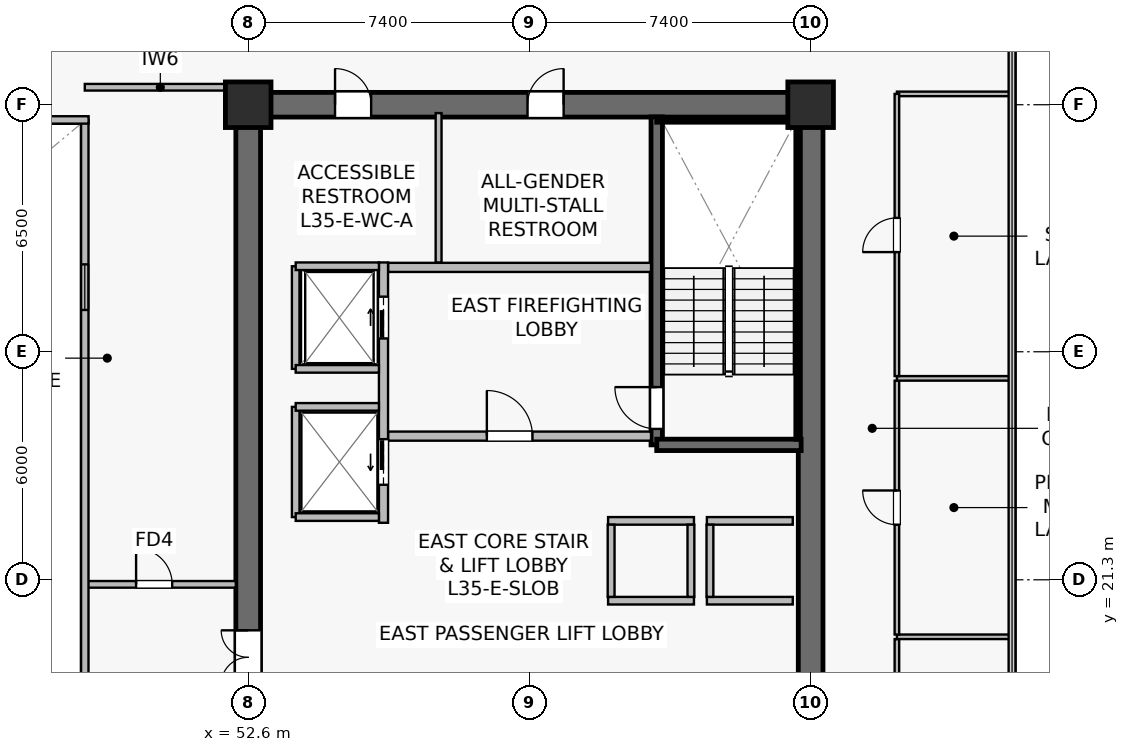
"""IFC4 building model, lengths in metres.
Left out: names, types, materials, properties, quantities, classifications, styles, units other than length and angle.
Written with IfcOpenShell. Run it as: python <this file> out.ifc"""

import sys

from ifc_helpers import new_model, si_unit, direction, frame, frame_2d, origin, origin_2d, place, context, subcontext, project, spatial, rectangle, extrude, source, transform, mapped, element, fill, save


model = new_model("IFC4")
c1 = context("Model", 3, precision=1e-05, world=origin(), true_north=direction((0.0, 1.0)))
c2 = subcontext(c1, "Body", "Model", "MODEL_VIEW")
j1 = project(units=[si_unit("LENGTHUNIT", "METRE"), si_unit("PLANEANGLEUNIT", "RADIAN")], contexts=[c1])
p1 = place(None, origin())
s1 = spatial("IfcSite", under=j1, at=p1, CompositionType="ELEMENT")
p2 = place(p1, origin())
s2 = spatial("IfcBuilding", under=s1, at=p2, CompositionType="ELEMENT")
p3 = place(p2, frame((0.0, 0.0, 146.1)))
s3 = spatial("IfcBuildingStorey", under=s2, at=p3, CompositionType="ELEMENT", Elevation=146.1)
p4 = place(p3, frame((52.275, 33.8, 0.0), z_axis=(0.0, 0.0, 1.0), x_axis=(1.0, 0.0, 0.0)))
e1 = element("IfcWall", 1, at=p4, inside=s3, PredefinedType="SHEAR", context=c2, shape_type="SweptSolid", body=[
    extrude(rectangle(XDim=15.45, YDim=0.65, at=frame_2d((7.725, 0.0))), origin(), (0.0, 0.0, 1.0), 3.79),
])
p5 = place(p4, frame((7.675, 0.0, 0.0)))
e2 = element("IfcOpeningElement", 2, at=p5, cuts=e1, PredefinedType="OPENING", context=c2, shape_type="SweptSolid", body=[
    extrude(rectangle(XDim=0.95, YDim=2.15, at=frame_2d((0.475, 1.075))), frame((0.0, 0.335, 0.0), z_axis=(0.0, -1.0, 0.0), x_axis=(1.0, 0.0, 0.0)), (0.0, 0.0, 1.0), 0.67),
])
p6 = place(p4, frame((2.61, 0.0, 0.0)))
e3 = element("IfcOpeningElement", 3, at=p6, cuts=e1, PredefinedType="OPENING", context=c2, shape_type="SweptSolid", body=[
    extrude(rectangle(XDim=0.95, YDim=2.15, at=frame_2d((0.475, 1.075))), frame((0.0, 0.335, 0.0), z_axis=(0.0, -1.0, 0.0), x_axis=(1.0, 0.0, 0.0)), (0.0, 0.0, 1.0), 0.67),
])
p7 = place(p3, frame((52.6, 15.125, 0.0), z_axis=(0.0, 0.0, 1.0), x_axis=(0.0, 1.0, 0.0)))
e4 = element("IfcWall", 4, at=p7, inside=s3, PredefinedType="SHEAR", context=c2, shape_type="SweptSolid", body=[
    extrude(rectangle(XDim=18.35, YDim=0.65, at=frame_2d((9.175, 0.0))), origin(), (0.0, 0.0, 1.0), 3.79),
])
p8 = place(p7, frame((3.425, 0.0, 0.0)))
e5 = element("IfcOpeningElement", 5, at=p8, cuts=e4, PredefinedType="OPENING", context=c2, shape_type="SweptSolid", body=[
    extrude(rectangle(XDim=1.42, YDim=2.2, at=frame_2d((0.71, 1.1))), frame((0.0, 0.335, 0.0), z_axis=(0.0, -1.0, 0.0), x_axis=(1.0, 0.0, 0.0)), (0.0, 0.0, 1.0), 0.67),
])
p9 = place(p3, frame((67.4, 15.125, 0.0), z_axis=(0.0, 0.0, 1.0), x_axis=(0.0, 1.0, 0.0)))
e6 = element("IfcWall", 6, at=p9, inside=s3, PredefinedType="SHEAR", context=c2, shape_type="SweptSolid", body=[
    extrude(rectangle(XDim=18.35, YDim=0.65, at=frame_2d((9.175, 0.0))), origin(), (0.0, 0.0, 1.0), 3.79),
])
p10 = place(p3, frame((63.35, 24.85, 0.0), z_axis=(0.0, 0.0, 1.0), x_axis=(0.0, 1.0, 0.0)))
e7 = element("IfcWall", 7, at=p10, inside=s3, PredefinedType="SHEAR", context=c2, shape_type="SweptSolid", body=[
    extrude(rectangle(XDim=8.63, YDim=0.3, at=frame_2d((4.315, 0.0))), origin(), (0.0, 0.0, 1.0), 3.79),
])
p11 = place(p10, frame((0.42, 0.0, 0.0)))
e8 = element("IfcOpeningElement", 8, at=p11, cuts=e7, PredefinedType="OPENING", context=c2, shape_type="SweptSolid", body=[
    extrude(rectangle(XDim=1.1, YDim=2.15, at=frame_2d((0.55, 1.075))), frame((0.0, 0.16, 0.0), z_axis=(0.0, -1.0, 0.0), x_axis=(1.0, 0.0, 0.0)), (0.0, 0.0, 1.0), 0.32),
])
p12 = place(p3, frame((63.35, 24.85, 0.0), z_axis=(0.0, 0.0, 1.0), x_axis=(1.0, 0.0, 0.0)))
e9 = element("IfcWall", 9, at=p12, inside=s3, PredefinedType="SHEAR", context=c2, shape_type="SweptSolid", body=[
    extrude(rectangle(XDim=3.8, YDim=0.3, at=frame_2d((1.9, 0.0))), origin(), (0.0, 0.0, 1.0), 3.79),
])
p13 = place(p3, frame((63.35, 33.4, 0.0), z_axis=(0.0, 0.0, 1.0), x_axis=(1.0, 0.0, 0.0)))
e10 = element("IfcWall", 10, at=p13, inside=s3, PredefinedType="SOLIDWALL", context=c2, shape_type="SweptSolid", body=[
    extrude(rectangle(XDim=3.72, YDim=0.12, at=frame_2d((1.86, 0.0))), origin(), (0.0, 0.0, 1.0), 3.79),
])
p14 = place(p3, frame((67.07, 25.0, 0.0), z_axis=(0.0, 0.0, 1.0), x_axis=(0.0, 1.0, 0.0)))
e11 = element("IfcWall", 11, at=p14, inside=s3, PredefinedType="SOLIDWALL", context=c2, shape_type="SweptSolid", body=[
    extrude(rectangle(XDim=8.32, YDim=0.12, at=frame_2d((4.16, 0.0))), origin(), (0.0, 0.0, 1.0), 3.79),
])
m1 = source(origin(), c2, "Body", "SweptSolid", [
    extrude(rectangle(XDim=1.2, YDim=1.2, at=origin_2d()), origin(), (0.0, 0.0, 1.0), 4.1),
])
for number, where, z_axis, x_axis in (
    (12, (52.6, 33.8, 0.0), (0.0, 0.0, 1.0), (1.0, 0.0, 0.0)),
    (13, (67.4, 33.8, 0.0), (0.0, 0.0, 1.0), (1.0, 0.0, 0.0)),
):
    element("IfcColumn", number, at=place(p3, frame(where, z_axis=z_axis, x_axis=x_axis)), inside=s3, PredefinedType="COLUMN", context=c2, shape_type="MappedRepresentation", body=[
        mapped(m1, transform((0.0, 0.0, 0.0), scale=1.0)),
    ])
p15 = place(p3, frame((56.28, 25.08, 0.0), z_axis=(0.0, 0.0, 1.0), x_axis=(1.0, 0.0, 0.0)))
e14 = element("IfcWall", 14, at=p15, inside=s3, PredefinedType="SOLIDWALL", context=c2, shape_type="SweptSolid", body=[
    extrude(rectangle(XDim=6.92, YDim=0.24, at=frame_2d((3.46, 0.0))), origin(), (0.0, 0.0, 1.0), 3.125),
])
p16 = place(p15, frame((2.6, 0.0, 0.0)))
e15 = element("IfcOpeningElement", 15, at=p16, cuts=e14, PredefinedType="OPENING", context=c2, shape_type="SweptSolid", body=[
    extrude(rectangle(XDim=1.2, YDim=2.16, at=frame_2d((0.6, 1.08))), frame((0.0, 0.13, 0.0), z_axis=(0.0, -1.0, 0.0), x_axis=(1.0, 0.0, 0.0)), (0.0, 0.0, 1.0), 0.26),
])
p17 = place(p3, frame((56.28, 29.52, 0.0), z_axis=(0.0, 0.0, 1.0), x_axis=(1.0, 0.0, 0.0)))
e16 = element("IfcWall", 16, at=p17, inside=s3, PredefinedType="SOLIDWALL", context=c2, shape_type="SweptSolid", body=[
    extrude(rectangle(XDim=6.92, YDim=0.24, at=frame_2d((3.46, 0.0))), origin(), (0.0, 0.0, 1.0), 3.125),
])
p18 = place(p3, frame((56.16, 22.8, 0.0), z_axis=(0.0, 0.0, 1.0), x_axis=(0.0, 1.0, 0.0)))
e17 = element("IfcWall", 17, at=p18, inside=s3, PredefinedType="SOLIDWALL", context=c2, shape_type="SweptSolid", body=[
    extrude(rectangle(XDim=6.85, YDim=0.24, at=frame_2d((3.425, 0.0))), origin(), (0.0, 0.0, 1.0), 2.875),
])
p19 = place(p18, frame((4.85, 0.0, 0.0)))
e18 = element("IfcOpeningElement", 18, at=p19, cuts=e17, PredefinedType="OPENING", context=c2, shape_type="SweptSolid", body=[
    extrude(rectangle(XDim=1.1, YDim=2.22, at=frame_2d((0.55, 1.11))), frame((0.0, 0.13, 0.0), z_axis=(0.0, -1.0, 0.0), x_axis=(1.0, 0.0, 0.0)), (0.0, 0.0, 1.0), 0.26),
])
p20 = place(p18, frame((1.0, 0.0, 0.0)))
e19 = element("IfcOpeningElement", 19, at=p20, cuts=e17, PredefinedType="OPENING", context=c2, shape_type="SweptSolid", body=[
    extrude(rectangle(XDim=1.2, YDim=2.22, at=frame_2d((0.6, 1.11))), frame((0.0, 0.13, 0.0), z_axis=(0.0, -1.0, 0.0), x_axis=(1.0, 0.0, 0.0)), (0.0, 0.0, 1.0), 0.26),
])
for number, where, z_axis, x_axis in (
    (20, (64.67, 20.75, 0.0), (0.0, 0.0, 1.0), (1.0, 0.0, 0.0)),
    (21, (64.67, 22.85, 0.0), (0.0, 0.0, 1.0), (1.0, 0.0, 0.0)),
):
    element("IfcWall", number, at=place(p3, frame(where, z_axis=z_axis, x_axis=x_axis)), inside=s3, PredefinedType="SOLIDWALL", context=c2, shape_type="SweptSolid", body=[
        extrude(rectangle(XDim=2.26, YDim=0.2, at=frame_2d((1.13, 0.0))), origin(), (0.0, 0.0, 1.0), 3.79),
    ])
p21 = place(p3, frame((64.75, 20.85, 0.0), z_axis=(0.0, 0.0, 1.0), x_axis=(0.0, 1.0, 0.0)))
e22 = element("IfcWall", 22, at=p21, inside=s3, PredefinedType="SOLIDWALL", context=c2, shape_type="SweptSolid", body=[
    extrude(rectangle(XDim=1.9, YDim=0.18, at=frame_2d((0.95, 0.0))), origin(), (0.0, 0.0, 1.0), 3.79),
])
for number, where, z_axis, x_axis in (
    (23, (62.07, 20.75, 0.0), (0.0, 0.0, 1.0), (1.0, 0.0, 0.0)),
    (24, (62.07, 22.85, 0.0), (0.0, 0.0, 1.0), (1.0, 0.0, 0.0)),
):
    element("IfcWall", number, at=place(p3, frame(where, z_axis=z_axis, x_axis=x_axis)), inside=s3, PredefinedType="SOLIDWALL", context=c2, shape_type="SweptSolid", body=[
        extrude(rectangle(XDim=2.26, YDim=0.2, at=frame_2d((1.13, 0.0))), origin(), (0.0, 0.0, 1.0), 3.79),
    ])
for number, where, z_axis, x_axis in (
    (25, (62.15, 20.85, 0.0), (0.0, 0.0, 1.0), (0.0, 1.0, 0.0)),
    (26, (64.25, 20.85, 0.0), (0.0, 0.0, 1.0), (0.0, 1.0, 0.0)),
):
    element("IfcWall", number, at=place(p3, frame(where, z_axis=z_axis, x_axis=x_axis)), inside=s3, PredefinedType="SOLIDWALL", context=c2, shape_type="SweptSolid", body=[
        extrude(rectangle(XDim=1.9, YDim=0.18, at=frame_2d((0.95, 0.0))), origin(), (0.0, 0.0, 1.0), 3.79),
    ])
p22 = place(p3, frame((53.85, 26.85, 0.0), z_axis=(0.0, 0.0, 1.0), x_axis=(0.0, 1.0, 0.0)))
e27 = element("IfcWall", 27, at=p22, inside=s3, PredefinedType="SOLIDWALL", context=c2, shape_type="SweptSolid", body=[
    extrude(rectangle(XDim=2.7, YDim=0.2, at=frame_2d((1.35, 0.0))), origin(), (0.0, 0.0, 1.0), 3.79),
])
p23 = place(p3, frame((53.85, 29.55, 0.0), z_axis=(0.0, 0.0, 1.0), x_axis=(1.0, 0.0, 0.0)))
e28 = element("IfcWall", 28, at=p23, inside=s3, PredefinedType="SOLIDWALL", context=c2, shape_type="SweptSolid", body=[
    extrude(rectangle(XDim=2.19, YDim=0.2, at=frame_2d((1.095, 0.0))), origin(), (0.0, 0.0, 1.0), 3.79),
])
p24 = place(p3, frame((53.85, 26.85, 0.0), z_axis=(0.0, 0.0, 1.0), x_axis=(1.0, 0.0, 0.0)))
e29 = element("IfcWall", 29, at=p24, inside=s3, PredefinedType="SOLIDWALL", context=c2, shape_type="SweptSolid", body=[
    extrude(rectangle(XDim=2.19, YDim=0.2, at=frame_2d((1.095, 0.0))), origin(), (0.0, 0.0, 1.0), 3.187),
])
p25 = place(p3, frame((53.85, 22.95, 0.0), z_axis=(0.0, 0.0, 1.0), x_axis=(0.0, 1.0, 0.0)))
e30 = element("IfcWall", 30, at=p25, inside=s3, PredefinedType="SOLIDWALL", context=c2, shape_type="SweptSolid", body=[
    extrude(rectangle(XDim=2.9, YDim=0.2, at=frame_2d((1.45, 0.0))), origin(), (0.0, 0.0, 1.0), 2.875),
])
for number, where, z_axis, x_axis in (
    (31, (53.85, 25.85, 0.0), (0.0, 0.0, 1.0), (1.0, 0.0, 0.0)),
    (32, (53.85, 22.95, 0.0), (0.0, 0.0, 1.0), (1.0, 0.0, 0.0)),
):
    element("IfcWall", number, at=place(p3, frame(where, z_axis=z_axis, x_axis=x_axis)), inside=s3, PredefinedType="SOLIDWALL", context=c2, shape_type="SweptSolid", body=[
        extrude(rectangle(XDim=2.19, YDim=0.2, at=frame_2d((1.095, 0.0))), origin(), (0.0, 0.0, 1.0), 3.79),
    ])
p26 = place(p3, frame((57.61, 29.65, 0.0), z_axis=(0.0, 0.0, 1.0), x_axis=(0.0, 1.0, 0.0)))
e33 = element("IfcWall", 33, at=p26, inside=s3, PredefinedType="PLUMBINGWALL", context=c2, shape_type="SweptSolid", body=[
    extrude(rectangle(XDim=3.93, YDim=0.155, at=frame_2d((1.965, 0.0))), origin(), (0.0, 0.0, 1.0), 3.79),
])
p27 = place(p3, frame((48.3, 34.26, 0.0), z_axis=(0.0, 0.0, 1.0), x_axis=(1.0, 0.0, 0.0)))
e34 = element("IfcWall", 34, at=p27, inside=s3, PredefinedType="PARTITIONING", context=c2, shape_type="SweptSolid", body=[
    extrude(rectangle(XDim=3.975, YDim=0.175, at=frame_2d((1.987, 0.0))), origin(), (0.0, 0.0, 1.0), 3.475),
])
p28 = place(p3, frame((48.3, 21.18, 0.0), z_axis=(0.0, 0.0, 1.0), x_axis=(1.0, 0.0, 0.0)))
e35 = element("IfcWall", 35, at=p28, inside=s3, PredefinedType="PARTITIONING", context=c2, shape_type="SweptSolid", body=[
    extrude(rectangle(XDim=3.975, YDim=0.175, at=frame_2d((1.987, 0.0))), origin(), (0.0, 0.0, 1.0), 3.79),
])
p29 = place(p28, frame((1.35, 0.0, 0.0)))
e36 = element("IfcOpeningElement", 36, at=p29, cuts=e35, PredefinedType="OPENING", context=c2, shape_type="SweptSolid", body=[
    extrude(rectangle(XDim=0.95, YDim=2.15, at=frame_2d((0.475, 1.075))), frame((0.0, 0.098, 0.0), z_axis=(0.0, -1.0, 0.0), x_axis=(1.0, 0.0, 0.0)), (0.0, 0.0, 1.0), 0.195),
])
p30 = place(p3, frame((48.3, 15.2, 0.0), z_axis=(0.0, 0.0, 1.0), x_axis=(0.0, 1.0, 0.0)))
e37 = element("IfcWall", 37, at=p30, inside=s3, PredefinedType="SOLIDWALL", context=c2, shape_type="SweptSolid", body=[
    extrude(rectangle(XDim=18.2, YDim=0.195, at=frame_2d((9.1, 0.0))), origin(), (0.0, 0.0, 1.0), 3.79),
])
p31 = place(p30, frame((1.8, 0.0, 0.9)))
e38 = element("IfcOpeningElement", 38, at=p31, cuts=e37, PredefinedType="OPENING", context=c2, shape_type="SweptSolid", body=[
    extrude(rectangle(XDim=1.2, YDim=1.35, at=frame_2d((0.6, 0.675))), frame((0.0, 0.107, 0.0), z_axis=(0.0, -1.0, 0.0), x_axis=(1.0, 0.0, 0.0)), (0.0, 0.0, 1.0), 0.215),
])
p32 = place(p30, frame((13.2, 0.0, 0.9)))
e39 = element("IfcOpeningElement", 39, at=p32, cuts=e37, PredefinedType="OPENING", context=c2, shape_type="SweptSolid", body=[
    extrude(rectangle(XDim=1.2, YDim=1.35, at=frame_2d((0.6, 0.675))), frame((0.0, 0.107, 0.0), z_axis=(0.0, -1.0, 0.0), x_axis=(1.0, 0.0, 0.0)), (0.0, 0.0, 1.0), 0.215),
])
p33 = place(p3, frame((26.4, 33.4, 0.0), z_axis=(0.0, 0.0, 1.0), x_axis=(1.0, 0.0, 0.0)))
e40 = element("IfcWall", 40, at=p33, inside=s3, PredefinedType="SOLIDWALL", context=c2, shape_type="SweptSolid", body=[
    extrude(rectangle(XDim=22.0, YDim=0.195, at=frame_2d((11.0, 0.0))), origin(), (0.0, 0.0, 1.0), 3.79),
])
p34 = place(p3, frame((69.67, 34.085, 0.0), z_axis=(0.0, 0.0, 1.0), x_axis=(1.0, 0.0, 0.0)))
e41 = element("IfcWall", 41, at=p34, inside=s3, PredefinedType="PARTITIONING", context=c2, shape_type="SweptSolid", body=[
    extrude(rectangle(XDim=3.02, YDim=0.12, at=frame_2d((1.51, 0.0))), origin(), (0.0, 0.0, 1.0), 3.79),
])
p35 = place(p3, frame((69.67, 14.515, 0.0), z_axis=(0.0, 0.0, 1.0), x_axis=(0.0, 1.0, 0.0)))
e42 = element("IfcWall", 42, at=p35, inside=s3, PredefinedType="PARTITIONING", context=c2, shape_type="SweptSolid", body=[
    extrude(rectangle(XDim=5.225, YDim=0.12, at=frame_2d((2.613, 0.0))), origin(), (0.0, 0.0, 1.0), 3.79),
])
p36 = place(p35, frame((2.163, 0.0, 0.0)))
e43 = element("IfcOpeningElement", 43, at=p36, cuts=e42, PredefinedType="OPENING", context=c2, shape_type="SweptSolid", body=[
    extrude(rectangle(XDim=0.9, YDim=2.1, at=frame_2d((0.45, 1.05))), frame((0.0, 0.07, 0.0), z_axis=(0.0, -1.0, 0.0), x_axis=(1.0, 0.0, 0.0)), (0.0, 0.0, 1.0), 0.14),
])
p37 = place(p3, frame((69.67, 19.8, 0.0), z_axis=(0.0, 0.0, 1.0), x_axis=(1.0, 0.0, 0.0)))
e44 = element("IfcWall", 44, at=p37, inside=s3, PredefinedType="PARTITIONING", context=c2, shape_type="SweptSolid", body=[
    extrude(rectangle(XDim=3.02, YDim=0.12, at=frame_2d((1.51, 0.0))), origin(), (0.0, 0.0, 1.0), 3.79),
])
p38 = place(p3, frame((69.67, 19.86, 0.0), z_axis=(0.0, 0.0, 1.0), x_axis=(0.0, 1.0, 0.0)))
e45 = element("IfcWall", 45, at=p38, inside=s3, PredefinedType="PARTITIONING", context=c2, shape_type="SweptSolid", body=[
    extrude(rectangle(XDim=6.68, YDim=0.12, at=frame_2d((3.34, 0.0))), origin(), (0.0, 0.0, 1.0), 3.79),
])
p39 = place(p38, frame((2.89, 0.0, 0.0)))
e46 = element("IfcOpeningElement", 46, at=p39, cuts=e45, PredefinedType="OPENING", context=c2, shape_type="SweptSolid", body=[
    extrude(rectangle(XDim=0.9, YDim=2.1, at=frame_2d((0.45, 1.05))), frame((0.0, 0.07, 0.0), z_axis=(0.0, -1.0, 0.0), x_axis=(1.0, 0.0, 0.0)), (0.0, 0.0, 1.0), 0.14),
])
p40 = place(p3, frame((69.67, 26.6, 0.0), z_axis=(0.0, 0.0, 1.0), x_axis=(1.0, 0.0, 0.0)))
e47 = element("IfcWall", 47, at=p40, inside=s3, PredefinedType="PARTITIONING", context=c2, shape_type="SweptSolid", body=[
    extrude(rectangle(XDim=3.02, YDim=0.12, at=frame_2d((1.51, 0.0))), origin(), (0.0, 0.0, 1.0), 3.79),
])
p41 = place(p3, frame((69.67, 26.66, 0.0), z_axis=(0.0, 0.0, 1.0), x_axis=(0.0, 1.0, 0.0)))
e48 = element("IfcWall", 48, at=p41, inside=s3, PredefinedType="PARTITIONING", context=c2, shape_type="SweptSolid", body=[
    extrude(rectangle(XDim=7.425, YDim=0.12, at=frame_2d((3.712, 0.0))), origin(), (0.0, 0.0, 1.0), 3.79),
])
p42 = place(p41, frame((3.262, 0.0, 0.0)))
e49 = element("IfcOpeningElement", 49, at=p42, cuts=e48, PredefinedType="OPENING", context=c2, shape_type="SweptSolid", body=[
    extrude(rectangle(XDim=0.9, YDim=2.1, at=frame_2d((0.45, 1.05))), frame((0.0, 0.07, 0.0), z_axis=(0.0, -1.0, 0.0), x_axis=(1.0, 0.0, 0.0)), (0.0, 0.0, 1.0), 0.14),
])
m2 = source(origin(), c2, "Body", "SweptSolid", [
    extrude(rectangle(XDim=1.2, YDim=1.35, at=frame_2d((0.6, 0.675))), frame((0.0, 0.03, 0.0), z_axis=(0.0, -1.0, 0.0), x_axis=(1.0, 0.0, 0.0)), (0.0, 0.0, 1.0), 0.06),
])
p43 = place(p32, origin())
e50 = element("IfcWindow", 50, at=p43, inside=s3, PartitioningType="SINGLE_PANEL", PredefinedType="WINDOW", context=c2, shape_type="MappedRepresentation", body=[
    mapped(m2, transform((0.0, 0.0, 0.0), scale=1.0)),
])
fill(e39, e50)
m3 = source(origin(), c2, "Body", "SweptSolid", [
    extrude(rectangle(XDim=1.1, YDim=2.15, at=frame_2d((0.55, 1.075))), frame((0.0, 0.025, 0.0), z_axis=(0.0, -1.0, 0.0), x_axis=(1.0, 0.0, 0.0)), (0.0, 0.0, 1.0), 0.05),
])
p44 = place(p11, origin())
e51 = element("IfcDoor", 51, at=p44, inside=s3, OperationType="SINGLE_SWING_RIGHT", PredefinedType="DOOR", context=c2, shape_type="MappedRepresentation", body=[
    mapped(m3, transform((0.0, 0.0, 0.0), scale=1.0)),
])
fill(e8, e51)
m4 = source(origin(), c2, "Body", "SweptSolid", [
    extrude(rectangle(XDim=1.2, YDim=2.16, at=frame_2d((0.6, 1.08))), frame((0.0, 0.025, 0.0), z_axis=(0.0, -1.0, 0.0), x_axis=(1.0, 0.0, 0.0)), (0.0, 0.0, 1.0), 0.05),
])
p45 = place(p16, origin())
e52 = element("IfcDoor", 52, at=p45, inside=s3, OperationType="SINGLE_SWING_LEFT", PredefinedType="DOOR", context=c2, shape_type="MappedRepresentation", body=[
    mapped(m4, transform((0.0, 0.0, 0.0), scale=1.0)),
])
fill(e15, e52)
m5 = source(origin(), c2, "Body", "SweptSolid", [
    extrude(rectangle(XDim=1.1, YDim=2.22, at=frame_2d((0.55, 1.11))), frame((0.0, 0.025, 0.0), z_axis=(0.0, -1.0, 0.0), x_axis=(1.0, 0.0, 0.0)), (0.0, 0.0, 1.0), 0.05),
])
p46 = place(p19, origin())
e53 = element("IfcDoor", 53, at=p46, inside=s3, OperationType="SLIDING_TO_RIGHT", PredefinedType="USERDEFINED", context=c2, shape_type="MappedRepresentation", body=[
    mapped(m5, transform((0.0, 0.0, 0.0), scale=1.0)),
])
fill(e18, e53)
m6 = source(origin(), c2, "Body", "SweptSolid", [
    extrude(rectangle(XDim=1.2, YDim=2.22, at=frame_2d((0.6, 1.11))), frame((0.0, 0.025, 0.0), z_axis=(0.0, -1.0, 0.0), x_axis=(1.0, 0.0, 0.0)), (0.0, 0.0, 1.0), 0.05),
])
p47 = place(p20, origin())
e54 = element("IfcDoor", 54, at=p47, inside=s3, OperationType="SLIDING_TO_LEFT", PredefinedType="USERDEFINED", context=c2, shape_type="MappedRepresentation", body=[
    mapped(m6, transform((0.0, 0.0, 0.0), scale=1.0)),
])
fill(e19, e54)
m7 = source(origin(), c2, "Body", "SweptSolid", [
    extrude(rectangle(XDim=1.42, YDim=2.2, at=frame_2d((0.71, 1.1))), frame((0.0, 0.025, 0.0), z_axis=(0.0, -1.0, 0.0), x_axis=(1.0, 0.0, 0.0)), (0.0, 0.0, 1.0), 0.05),
])
p48 = place(p8, origin())
e55 = element("IfcDoor", 55, at=p48, inside=s3, OperationType="DOUBLE_DOOR_SINGLE_SWING", PredefinedType="DOOR", context=c2, shape_type="MappedRepresentation", body=[
    mapped(m7, transform((0.0, 0.0, 0.0), scale=1.0)),
])
fill(e5, e55)
m8 = source(origin(), c2, "Body", "SweptSolid", [
    extrude(rectangle(XDim=0.95, YDim=2.15, at=frame_2d((0.475, 1.075))), frame((0.0, 0.025, 0.0), z_axis=(0.0, -1.0, 0.0), x_axis=(1.0, 0.0, 0.0)), (0.0, 0.0, 1.0), 0.05),
])
p49 = place(p5, origin())
e56 = element("IfcDoor", 56, at=p49, inside=s3, OperationType="SINGLE_SWING_RIGHT", PredefinedType="DOOR", context=c2, shape_type="MappedRepresentation", body=[
    mapped(m8, transform((0.0, 0.0, 0.0), scale=1.0)),
])
fill(e2, e56)
p50 = place(p6, origin())
e57 = element("IfcDoor", 57, at=p50, inside=s3, OperationType="SINGLE_SWING_LEFT", PredefinedType="DOOR", context=c2, shape_type="MappedRepresentation", body=[
    mapped(m8, transform((0.0, 0.0, 0.0), scale=1.0)),
])
fill(e3, e57)
p51 = place(p29, origin())
e58 = element("IfcDoor", 58, at=p51, inside=s3, OperationType="SINGLE_SWING_LEFT", PredefinedType="DOOR", context=c2, shape_type="MappedRepresentation", body=[
    mapped(m8, transform((0.0, 0.0, 0.0), scale=1.0)),
])
fill(e36, e58)
m9 = source(origin(), c2, "Body", "SweptSolid", [
    extrude(rectangle(XDim=0.9, YDim=2.1, at=frame_2d((0.45, 1.05))), frame((0.0, 0.025, 0.0), z_axis=(0.0, -1.0, 0.0), x_axis=(1.0, 0.0, 0.0)), (0.0, 0.0, 1.0), 0.05),
])
p52 = place(p39, origin())
e59 = element("IfcDoor", 59, at=p52, inside=s3, OperationType="SINGLE_SWING_RIGHT", PredefinedType="DOOR", context=c2, shape_type="MappedRepresentation", body=[
    mapped(m9, transform((0.0, 0.0, 0.0), scale=1.0)),
])
fill(e46, e59)
p53 = place(p42, origin())
e60 = element("IfcDoor", 60, at=p53, inside=s3, OperationType="SINGLE_SWING_LEFT", PredefinedType="DOOR", context=c2, shape_type="MappedRepresentation", body=[
    mapped(m9, transform((0.0, 0.0, 0.0), scale=1.0)),
])
fill(e49, e60)
save(model, sys.argv[1])
